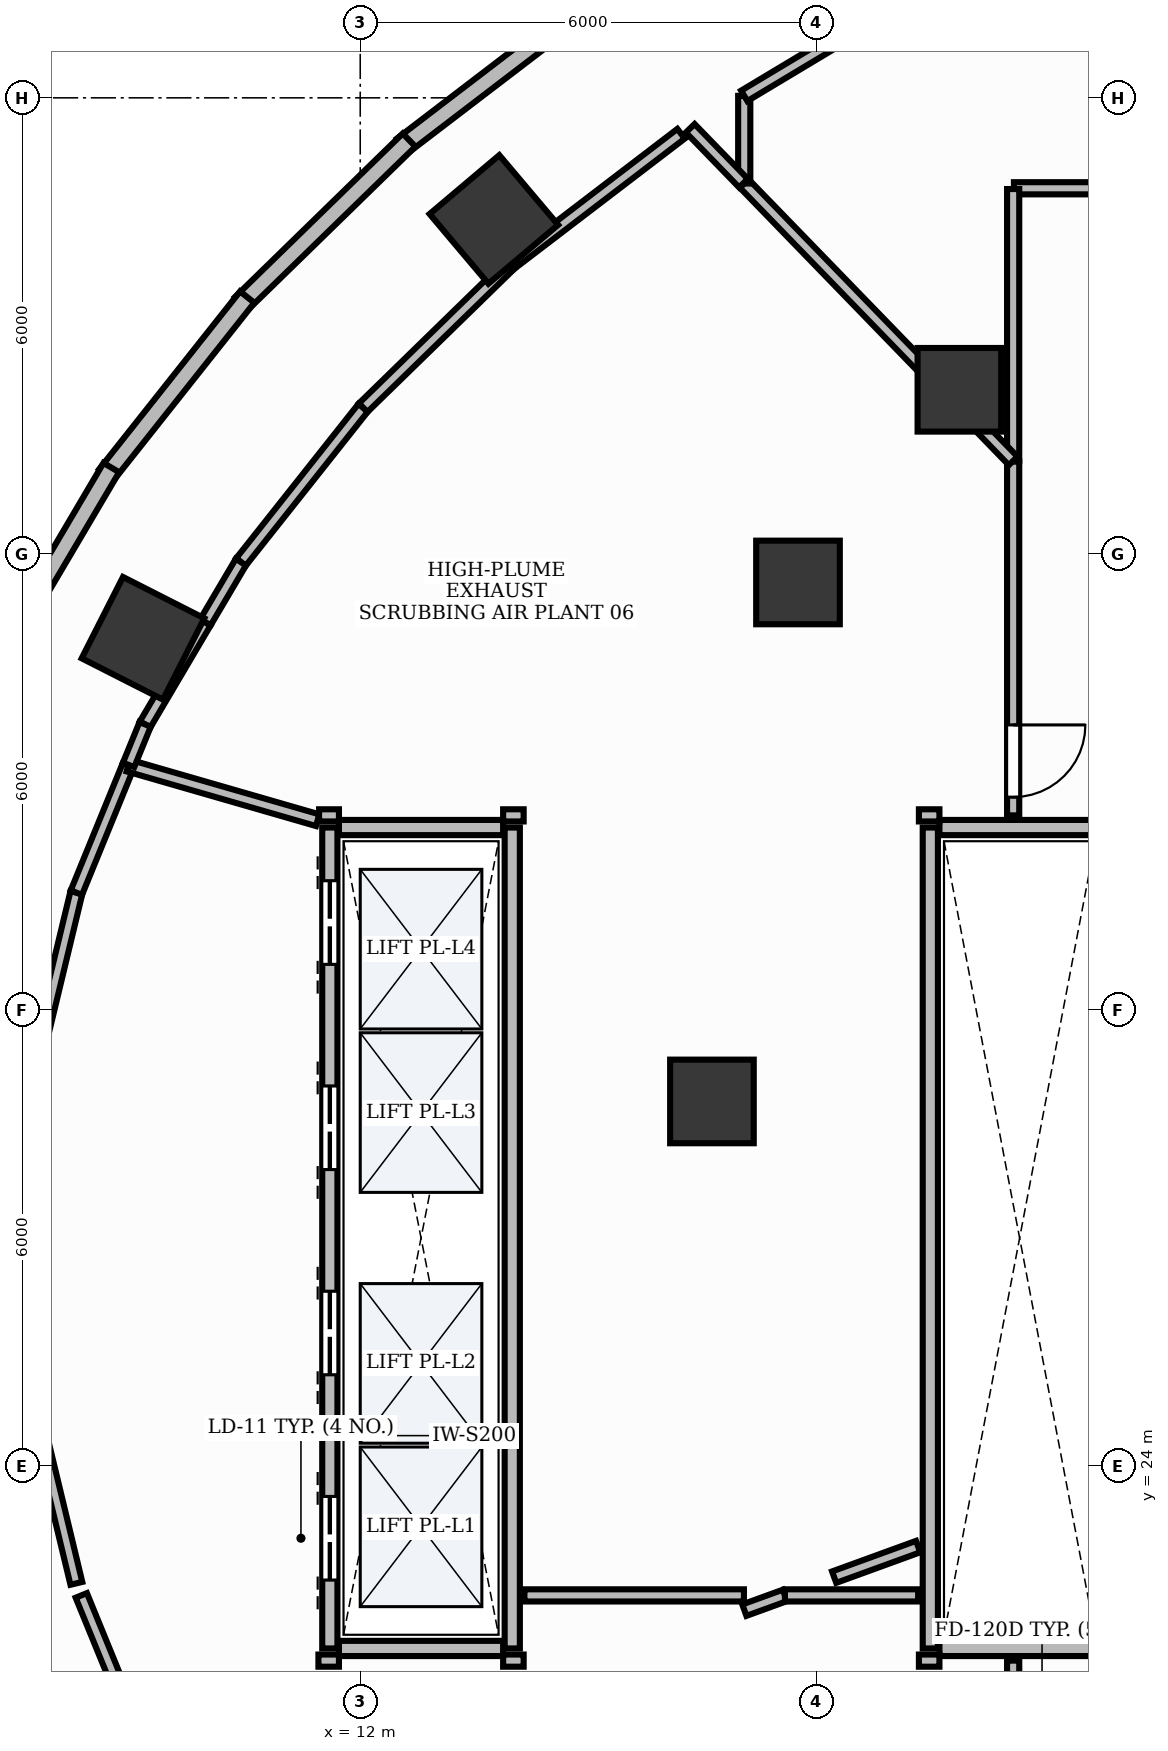
"""IFC4 building model, lengths in metres.
Left out: names, types, materials, properties, quantities, classifications, styles, units other than length and angle.
Written with IfcOpenShell. Run it as: python <this file> out.ifc"""

import sys

from ifc_helpers import new_model, si_unit, direction, frame, frame_2d, origin, origin_2d, place, context, subcontext, project, spatial, rectangle, extrude, element, fill, save


model = new_model("IFC4")
c1 = context("Model", 3, precision=1e-05, world=origin(), true_north=direction((0.0, 1.0)))
c2 = subcontext(c1, "Body", "Model", "MODEL_VIEW")
j1 = project(units=[si_unit("LENGTHUNIT", "METRE"), si_unit("PLANEANGLEUNIT", "RADIAN")], contexts=[c1])
p1 = place(None, origin())
s1 = spatial("IfcSite", under=j1, at=p1, CompositionType="ELEMENT")
p2 = place(p1, origin())
s2 = spatial("IfcBuilding", under=s1, at=p2, CompositionType="ELEMENT")
p3 = place(p2, frame((0.0, 0.0, 84.6)))
s3 = spatial("IfcBuildingStorey", under=s2, at=p3, CompositionType="ELEMENT", Elevation=84.6)
p4 = place(p3, frame((13.758, 40.4, -0.0), z_axis=(0.0, 0.0, 1.0), x_axis=(0.764246456939, 0.644924300253, 0.0)))
e1 = element("IfcColumn", 1, at=p4, inside=s3, PredefinedType="COLUMN", context=c2, shape_type="SweptSolid", body=[
    extrude(rectangle(XDim=1.2, YDim=1.2, at=origin_2d()), origin(), (0.0, 0.0, 1.0), 5.101),
])
p5 = place(p3, frame((19.883, 38.159, -0.0), z_axis=(0.0, 0.0, 1.0), x_axis=(1.0, 0.0, 0.0)))
e2 = element("IfcColumn", 2, at=p5, inside=s3, PredefinedType="COLUMN", context=c2, shape_type="SweptSolid", body=[
    extrude(rectangle(XDim=1.1, YDim=1.1, at=origin_2d()), origin(), (0.0, 0.0, 1.0), 5.101),
])
p6 = place(p3, frame((9.142, 34.889, -0.0), z_axis=(0.0, 0.0, 1.0), x_axis=(0.453057191132, 0.891481453292, 0.0)))
e3 = element("IfcColumn", 3, at=p6, inside=s3, PredefinedType="COLUMN", context=c2, shape_type="SweptSolid", body=[
    extrude(rectangle(XDim=1.2, YDim=1.2, at=origin_2d()), origin(), (0.0, 0.0, 1.0), 5.101),
])
for number, where, z_axis, x_axis in (
    (4, (17.759, 35.624, -0.0), (0.0, 0.0, 1.0), (1.0, 0.0, 0.0)),
    (5, (16.627, 28.797, -0.0), (0.0, 0.0, 1.0), (1.0, 0.0, 0.0)),
):
    element("IfcColumn", number, at=place(p3, frame(where, z_axis=z_axis, x_axis=x_axis)), inside=s3, PredefinedType="COLUMN", context=c2, shape_type="SweptSolid", body=[
        extrude(rectangle(XDim=1.1, YDim=1.1, at=origin_2d()), origin(), (0.0, 0.0, 1.0), 5.101),
    ])
p7 = place(p3, frame((15.085, 43.302, 0.0), z_axis=(0.0, 0.0, 1.0), x_axis=(-0.7944993285, -0.607265030289, 0.0)))
e6 = element("IfcWall", 6, at=p7, inside=s3, PredefinedType="STANDARD", context=c2, shape_type="SweptSolid", body=[
    extrude(rectangle(XDim=3.183, YDim=0.24, at=frame_2d((1.591, 0.0))), origin(), (0.0, 0.0, 1.0), 4.67),
])
p8 = place(p3, frame((12.643, 41.444, 0.0), z_axis=(0.0, 0.0, 1.0), x_axis=(-0.716118916223, -0.697978293235, 0.0)))
e7 = element("IfcWall", 7, at=p8, inside=s3, PredefinedType="STANDARD", context=c2, shape_type="SweptSolid", body=[
    extrude(rectangle(XDim=3.082, YDim=0.24, at=frame_2d((1.541, 0.0))), origin(), (0.0, 0.0, 1.0), 5.1),
])
p9 = place(p3, frame((10.513, 39.379, 0.0), z_axis=(0.0, 0.0, 1.0), x_axis=(-0.620956469373, -0.783845050469, 0.0)))
e8 = element("IfcWall", 8, at=p9, inside=s3, PredefinedType="STANDARD", context=c2, shape_type="SweptSolid", body=[
    extrude(rectangle(XDim=2.984, YDim=0.24, at=frame_2d((1.492, 0.0))), origin(), (0.0, 0.0, 1.0), 5.1),
])
p10 = place(p3, frame((8.725, 37.135, 0.0), z_axis=(0.0, 0.0, 1.0), x_axis=(-0.508169504761, -0.861257078015, 0.0)))
e9 = element("IfcWall", 9, at=p10, inside=s3, PredefinedType="STANDARD", context=c2, shape_type="SweptSolid", body=[
    extrude(rectangle(XDim=2.895, YDim=0.24, at=frame_2d((1.448, 0.0))), origin(), (0.0, 0.0, 1.0), 5.1),
])
p11 = place(p3, frame((11.6, 21.6, 0.0), z_axis=(0.0, 0.0, 1.0), x_axis=(0.0, 1.0, 0.0)))
e10 = element("IfcWall", 10, at=p11, inside=s3, PredefinedType="PARTITIONING", context=c2, shape_type="SweptSolid", body=[
    extrude(rectangle(XDim=10.8, YDim=0.2, at=frame_2d((5.4, 0.0))), origin(), (0.0, 0.0, 1.0), 3.96),
])
p12 = place(p11, frame((0.9, 0.0, 0.0)))
e11 = element("IfcOpeningElement", 11, at=p12, cuts=e10, PredefinedType="OPENING", context=c2, shape_type="SweptSolid", body=[
    extrude(rectangle(XDim=1.1, YDim=2.2, at=frame_2d((0.55, 1.1))), frame((0.0, 0.115, 0.0), z_axis=(0.0, -1.0, 0.0), x_axis=(1.0, 0.0, 0.0)), (0.0, 0.0, 1.0), 0.23),
])
p13 = place(p11, frame((3.6, 0.0, 0.0)))
e12 = element("IfcOpeningElement", 12, at=p13, cuts=e10, PredefinedType="OPENING", context=c2, shape_type="SweptSolid", body=[
    extrude(rectangle(XDim=1.1, YDim=2.2, at=frame_2d((0.55, 1.1))), frame((0.0, 0.115, 0.0), z_axis=(0.0, -1.0, 0.0), x_axis=(1.0, 0.0, 0.0)), (0.0, 0.0, 1.0), 0.23),
])
p14 = place(p11, frame((6.3, 0.0, 0.0)))
e13 = element("IfcOpeningElement", 13, at=p14, cuts=e10, PredefinedType="OPENING", context=c2, shape_type="SweptSolid", body=[
    extrude(rectangle(XDim=1.1, YDim=2.2, at=frame_2d((0.55, 1.1))), frame((0.0, 0.115, 0.0), z_axis=(0.0, -1.0, 0.0), x_axis=(1.0, 0.0, 0.0)), (0.0, 0.0, 1.0), 0.23),
])
p15 = place(p11, frame((9.0, 0.0, 0.0)))
e14 = element("IfcOpeningElement", 14, at=p15, cuts=e10, PredefinedType="OPENING", context=c2, shape_type="SweptSolid", body=[
    extrude(rectangle(XDim=1.1, YDim=2.2, at=frame_2d((0.55, 1.1))), frame((0.0, 0.115, 0.0), z_axis=(0.0, -1.0, 0.0), x_axis=(1.0, 0.0, 0.0)), (0.0, 0.0, 1.0), 0.23),
])
p16 = place(p3, frame((14.0, 21.6, 0.0), z_axis=(0.0, 0.0, 1.0), x_axis=(0.0, 1.0, 0.0)))
e15 = element("IfcWall", 15, at=p16, inside=s3, PredefinedType="PARTITIONING", context=c2, shape_type="SweptSolid", body=[
    extrude(rectangle(XDim=10.8, YDim=0.2, at=frame_2d((5.4, 0.0))), origin(), (0.0, 0.0, 1.0), 3.96),
])
for number, where, z_axis, x_axis in (
    (16, (11.72, 21.6, 0.0), (0.0, 0.0, 1.0), (1.0, 0.0, 0.0)),
    (17, (11.72, 32.4, 0.0), (0.0, 0.0, 1.0), (1.0, 0.0, 0.0)),
):
    element("IfcWall", number, at=place(p3, frame(where, z_axis=z_axis, x_axis=x_axis)), inside=s3, PredefinedType="PARTITIONING", context=c2, shape_type="SweptSolid", body=[
        extrude(rectangle(XDim=2.16, YDim=0.2, at=frame_2d((1.08, 0.0))), origin(), (0.0, 0.0, 1.0), 3.96),
    ])
p17 = place(p3, frame((19.5, 21.6, 0.0), z_axis=(0.0, 0.0, 1.0), x_axis=(0.0, 1.0, 0.0)))
e18 = element("IfcWall", 18, at=p17, inside=s3, PredefinedType="PARTITIONING", context=c2, shape_type="SweptSolid", body=[
    extrude(rectangle(XDim=10.8, YDim=0.2, at=frame_2d((5.4, 0.0))), origin(), (0.0, 0.0, 1.0), 3.96),
])
for number, where, z_axis, x_axis in (
    (19, (19.62, 21.6, 0.0), (0.0, 0.0, 1.0), (1.0, 0.0, 0.0)),
    (20, (19.62, 32.4, 0.0), (0.0, 0.0, 1.0), (1.0, 0.0, 0.0)),
):
    element("IfcWall", number, at=place(p3, frame(where, z_axis=z_axis, x_axis=x_axis)), inside=s3, PredefinedType="PARTITIONING", context=c2, shape_type="SweptSolid", body=[
        extrude(rectangle(XDim=2.11, YDim=0.2, at=frame_2d((1.055, 0.0))), origin(), (0.0, 0.0, 1.0), 3.96),
    ])
p18 = place(p3, frame((20.59, 21.44, 0.0), z_axis=(0.0, 0.0, 1.0), x_axis=(0.0, -1.0, 0.0)))
e21 = element("IfcWall", 21, at=p18, inside=s3, PredefinedType="PARTITIONING", context=c2, shape_type="SweptSolid", body=[
    extrude(rectangle(XDim=6.49, YDim=0.16, at=frame_2d((3.245, 0.0))), origin(), (0.0, 0.0, 1.0), 3.96),
])
p19 = place(p18, frame((0.24, 0.0, 0.0)))
e22 = element("IfcOpeningElement", 22, at=p19, cuts=e21, PredefinedType="OPENING", context=c2, shape_type="SweptSolid", body=[
    extrude(rectangle(XDim=0.95, YDim=2.15, at=frame_2d((0.475, 1.075))), frame((0.0, 0.095, 0.0), z_axis=(0.0, -1.0, 0.0), x_axis=(1.0, 0.0, 0.0)), (0.0, 0.0, 1.0), 0.19),
])
p20 = place(p3, frame((25.294, 40.81, 0.0), z_axis=(0.0, 0.0, 1.0), x_axis=(-1.0, 0.0, 0.0)))
e23 = element("IfcWall", 23, at=p20, inside=s3, PredefinedType="PARTITIONING", context=c2, shape_type="SweptSolid", body=[
    extrude(rectangle(XDim=4.694, YDim=0.16, at=frame_2d((2.347, 0.0))), origin(), (0.0, 0.0, 1.0), 3.96),
])
p21 = place(p20, frame((0.664, 0.0, 0.0)))
e24 = element("IfcOpeningElement", 24, at=p21, cuts=e23, PredefinedType="OPENING", context=c2, shape_type="SweptSolid", body=[
    extrude(rectangle(XDim=0.95, YDim=2.15, at=frame_2d((0.475, 1.075))), frame((0.0, 0.095, 0.0), z_axis=(0.0, -1.0, 0.0), x_axis=(1.0, 0.0, 0.0)), (0.0, 0.0, 1.0), 0.19),
])
p22 = place(p3, frame((20.59, 37.214, 0.0), z_axis=(0.0, 0.0, 1.0), x_axis=(0.0, -1.0, 0.0)))
e25 = element("IfcWall", 25, at=p22, inside=s3, PredefinedType="PARTITIONING", context=c2, shape_type="SweptSolid", body=[
    extrude(rectangle(XDim=4.654, YDim=0.16, at=frame_2d((2.327, 0.0))), origin(), (0.0, 0.0, 1.0), 3.96),
])
p23 = place(p22, frame((3.464, 0.0, 0.0)))
e26 = element("IfcOpeningElement", 26, at=p23, cuts=e25, PredefinedType="OPENING", context=c2, shape_type="SweptSolid", body=[
    extrude(rectangle(XDim=0.95, YDim=2.15, at=frame_2d((0.475, 1.075))), frame((0.0, 0.095, 0.0), z_axis=(0.0, -1.0, 0.0), x_axis=(1.0, 0.0, 0.0)), (0.0, 0.0, 1.0), 0.19),
])
p24 = place(p3, frame((7.722, 29.283, 0.0), z_axis=(0.0, 0.0, 1.0), x_axis=(0.233654937946, 0.972319582222, 0.0)))
e27 = element("IfcWall", 27, at=p24, inside=s3, PredefinedType="PARTITIONING", context=c2, shape_type="SweptSolid", body=[
    extrude(rectangle(XDim=2.325, YDim=0.16, at=frame_2d((1.163, 0.0))), origin(), (0.0, 0.0, 1.0), 3.96),
])
p25 = place(p3, frame((8.266, 31.544, 0.0), z_axis=(0.0, 0.0, 1.0), x_axis=(0.378374816085, 0.925652471802, 0.0)))
e28 = element("IfcWall", 28, at=p25, inside=s3, PredefinedType="PARTITIONING", context=c2, shape_type="SweptSolid", body=[
    extrude(rectangle(XDim=1.805, YDim=0.16, at=frame_2d((0.903, 0.0))), origin(), (0.0, 0.0, 1.0), 3.96),
])
p26 = place(p3, frame((8.949, 33.215, 0.0), z_axis=(0.0, 0.0, 1.0), x_axis=(0.960827931487, -0.277145604466, 0.0)))
e29 = element("IfcWall", 29, at=p26, inside=s3, PredefinedType="PARTITIONING", context=c2, shape_type="SweptSolid", body=[
    extrude(rectangle(XDim=2.593, YDim=0.16, at=frame_2d((1.296, 0.0))), origin(), (0.0, 0.0, 1.0), 3.96),
])
for number, where, z_axis, x_axis in (
    (30, (11.45, 21.44, 0.0), (0.0, 0.0, 1.0), (1.0, 0.0, 0.0)),
    (31, (13.88, 21.44, 0.0), (0.0, 0.0, 1.0), (1.0, 0.0, 0.0)),
):
    element("IfcWall", number, at=place(p3, frame(where, z_axis=z_axis, x_axis=x_axis)), inside=s3, PredefinedType="PARTITIONING", context=c2, shape_type="SweptSolid", body=[
        extrude(rectangle(XDim=0.27, YDim=0.16, at=frame_2d((0.135, 0.0))), origin(), (0.0, 0.0, 1.0), 3.96),
    ])
p27 = place(p3, frame((14.16, 22.298, 0.0), z_axis=(0.0, 0.0, 1.0), x_axis=(1.0, 0.0, 0.0)))
e32 = element("IfcWall", 32, at=p27, inside=s3, PredefinedType="PARTITIONING", context=c2, shape_type="SweptSolid", body=[
    extrude(rectangle(XDim=2.888, YDim=0.16, at=frame_2d((1.444, 0.0))), origin(), (0.0, 0.0, 1.0), 3.96),
])
p28 = place(p3, frame((17.053, 22.104, 0.0), z_axis=(0.0, 0.0, 1.0), x_axis=(0.93978087077, 0.34177758109, 0.0)))
e33 = element("IfcWall", 33, at=p28, inside=s3, PredefinedType="PARTITIONING", context=c2, shape_type="SweptSolid", body=[
    extrude(rectangle(XDim=0.568, YDim=0.16, at=frame_2d((0.284, 0.0))), origin(), (0.0, 0.0, 1.0), 3.96),
])
p29 = place(p3, frame((17.587, 22.298, 0.0), z_axis=(0.0, 0.0, 1.0), x_axis=(1.0, 0.0, 0.0)))
e34 = element("IfcWall", 34, at=p29, inside=s3, PredefinedType="PARTITIONING", context=c2, shape_type="SweptSolid", body=[
    extrude(rectangle(XDim=1.752, YDim=0.16, at=frame_2d((0.876, 0.0))), origin(), (0.0, 0.0, 1.0), 3.96),
])
p30 = place(p3, frame((19.35, 21.44, 0.0), z_axis=(0.0, 0.0, 1.0), x_axis=(1.0, 0.0, 0.0)))
e35 = element("IfcWall", 35, at=p30, inside=s3, PredefinedType="PARTITIONING", context=c2, shape_type="SweptSolid", body=[
    extrude(rectangle(XDim=0.27, YDim=0.16, at=frame_2d((0.135, 0.0))), origin(), (0.0, 0.0, 1.0), 3.96),
])
p31 = place(p3, frame((9.17, 20.243, 0.0), z_axis=(0.0, 0.0, 1.0), x_axis=(-0.378303005032, 0.925681822433, 0.0)))
e36 = element("IfcWall", 36, at=p31, inside=s3, PredefinedType="PARTITIONING", context=c2, shape_type="SweptSolid", body=[
    extrude(rectangle(XDim=2.219, YDim=0.16, at=frame_2d((1.11, 0.0))), origin(), (0.0, 0.0, 1.0), 3.96),
])
p32 = place(p3, frame((8.265, 22.456, 0.0), z_axis=(0.0, 0.0, 1.0), x_axis=(-0.233654937946, 0.972319582222, 0.0)))
e37 = element("IfcWall", 37, at=p32, inside=s3, PredefinedType="PARTITIONING", context=c2, shape_type="SweptSolid", body=[
    extrude(rectangle(XDim=2.325, YDim=0.16, at=frame_2d((1.163, 0.0))), origin(), (0.0, 0.0, 1.0), 3.96),
])
p33 = place(p3, frame((20.59, 40.8, 0.0), z_axis=(0.0, 0.0, 1.0), x_axis=(0.0, -1.0, 0.0)))
e38 = element("IfcWall", 38, at=p33, inside=s3, PredefinedType="PARTITIONING", context=c2, shape_type="SweptSolid", body=[
    extrude(rectangle(XDim=3.576, YDim=0.16, at=frame_2d((1.788, 0.0))), origin(), (0.0, 0.0, 1.0), 3.96),
])
p34 = place(p3, frame((20.59, 37.224, 0.0), z_axis=(0.0, 0.0, 1.0), x_axis=(-0.696094823364, 0.717949856805, 0.0)))
e39 = element("IfcWall", 39, at=p34, inside=s3, PredefinedType="PARTITIONING", context=c2, shape_type="SweptSolid", body=[
    extrude(rectangle(XDim=5.083, YDim=0.16, at=frame_2d((2.542, 0.0))), origin(), (0.0, 0.0, 1.0), 3.96),
])
p35 = place(p3, frame((17.052, 40.873, 0.0), z_axis=(0.0, 0.0, 1.0), x_axis=(0.0, 1.0, 0.0)))
e40 = element("IfcWall", 40, at=p35, inside=s3, PredefinedType="PARTITIONING", context=c2, shape_type="SweptSolid", body=[
    extrude(rectangle(XDim=1.153, YDim=0.16, at=frame_2d((0.577, 0.0))), origin(), (0.0, 0.0, 1.0), 3.96),
])
p36 = place(p3, frame((17.052, 42.026, 0.0), z_axis=(0.0, 0.0, 1.0), x_axis=(0.857525745267, 0.514441052214, 0.0)))
e41 = element("IfcWall", 41, at=p36, inside=s3, PredefinedType="PARTITIONING", context=c2, shape_type="SweptSolid", body=[
    extrude(rectangle(XDim=1.969, YDim=0.16, at=frame_2d((0.984, 0.0))), origin(), (0.0, 0.0, 1.0), 3.96),
])
p37 = place(p3, frame((9.17, 33.757, 0.0), z_axis=(0.0, 0.0, 1.0), x_axis=(0.508116288895, 0.861288474879, 0.0)))
e42 = element("IfcWall", 42, at=p37, inside=s3, PredefinedType="PARTITIONING", context=c2, shape_type="SweptSolid", body=[
    extrude(rectangle(XDim=1.557, YDim=0.16, at=frame_2d((0.778, 0.0))), origin(), (0.0, 0.0, 1.0), 3.96),
])
p38 = place(p3, frame((9.964, 35.102, 0.0), z_axis=(0.0, 0.0, 1.0), x_axis=(0.508192213781, 0.861243678556, 0.0)))
e43 = element("IfcWall", 43, at=p38, inside=s3, PredefinedType="PARTITIONING", context=c2, shape_type="SweptSolid", body=[
    extrude(rectangle(XDim=0.919, YDim=0.16, at=frame_2d((0.459, 0.0))), origin(), (0.0, 0.0, 1.0), 3.96),
])
p39 = place(p3, frame((10.431, 35.894, 0.0), z_axis=(0.0, 0.0, 1.0), x_axis=(0.621019334477, 0.783795245078, 0.0)))
e44 = element("IfcWall", 44, at=p39, inside=s3, PredefinedType="PARTITIONING", context=c2, shape_type="SweptSolid", body=[
    extrude(rectangle(XDim=2.589, YDim=0.16, at=frame_2d((1.294, 0.0))), origin(), (0.0, 0.0, 1.0), 3.96),
])
p40 = place(p3, frame((12.039, 37.924, 0.0), z_axis=(0.0, 0.0, 1.0), x_axis=(0.716117399469, 0.697979849407, 0.0)))
e45 = element("IfcWall", 45, at=p40, inside=s3, PredefinedType="PARTITIONING", context=c2, shape_type="SweptSolid", body=[
    extrude(rectangle(XDim=2.706, YDim=0.16, at=frame_2d((1.353, 0.0))), origin(), (0.0, 0.0, 1.0), 3.96),
])
p41 = place(p3, frame((13.977, 39.812, 0.0), z_axis=(0.0, 0.0, 1.0), x_axis=(0.794468240787, 0.607305700928, 0.0)))
e46 = element("IfcWall", 46, at=p41, inside=s3, PredefinedType="PARTITIONING", context=c2, shape_type="SweptSolid", body=[
    extrude(rectangle(XDim=2.824, YDim=0.16, at=frame_2d((1.412, 0.0))), origin(), (0.0, 0.0, 1.0), 3.96),
])
p42 = place(p3, frame((16.342, 41.6, 0.0), z_axis=(0.0, 0.0, 1.0), x_axis=(0.696104152684, -0.71794081136, 0.0)))
e47 = element("IfcWall", 47, at=p42, inside=s3, PredefinedType="PARTITIONING", context=c2, shape_type="SweptSolid", body=[
    extrude(rectangle(XDim=1.006, YDim=0.16, at=frame_2d((0.503, 0.0))), origin(), (0.0, 0.0, 1.0), 3.96),
])
p43 = place(p3, frame((19.62, 32.56, 0.0), z_axis=(0.0, 0.0, 1.0), x_axis=(-1.0, 0.0, 0.0)))
e48 = element("IfcWall", 48, at=p43, inside=s3, PredefinedType="PARTITIONING", context=c2, shape_type="SweptSolid", body=[
    extrude(rectangle(XDim=0.27, YDim=0.16, at=frame_2d((0.135, 0.0))), origin(), (0.0, 0.0, 1.0), 3.96),
])
p44 = place(p3, frame((19.34, 22.94, 0.0), z_axis=(0.0, 0.0, 1.0), x_axis=(-0.939714591609, -0.341959772952, 0.0)))
e49 = element("IfcWall", 49, at=p44, inside=s3, PredefinedType="PARTITIONING", context=c2, shape_type="SweptSolid", body=[
    extrude(rectangle(XDim=1.176, YDim=0.16, at=frame_2d((0.588, 0.0))), origin(), (0.0, 0.0, 1.0), 3.96),
])
p45 = place(p3, frame((14.15, 32.56, 0.0), z_axis=(0.0, 0.0, 1.0), x_axis=(-1.0, 0.0, 0.0)))
e50 = element("IfcWall", 50, at=p45, inside=s3, PredefinedType="PARTITIONING", context=c2, shape_type="SweptSolid", body=[
    extrude(rectangle(XDim=0.27, YDim=0.16, at=frame_2d((0.135, 0.0))), origin(), (0.0, 0.0, 1.0), 3.96),
])
p46 = place(p3, frame((11.72, 32.56, 0.0), z_axis=(0.0, 0.0, 1.0), x_axis=(-1.0, 0.0, 0.0)))
e51 = element("IfcWall", 51, at=p46, inside=s3, PredefinedType="PARTITIONING", context=c2, shape_type="SweptSolid", body=[
    extrude(rectangle(XDim=0.262, YDim=0.16, at=frame_2d((0.131, 0.0))), origin(), (0.0, 0.0, 1.0), 3.96),
])
p47 = place(p3, frame((8.953, 33.225, 0.0), z_axis=(0.0, 0.0, 1.0), x_axis=(0.378119955125, 0.925756609232, 0.0)))
e52 = element("IfcWall", 52, at=p47, inside=s3, PredefinedType="PARTITIONING", context=c2, shape_type="SweptSolid", body=[
    extrude(rectangle(XDim=0.575, YDim=0.16, at=frame_2d((0.287, 0.0))), origin(), (0.0, 0.0, 1.0), 3.96),
])
p48 = place(p12, origin())
e53 = element("IfcDoor", 53, at=p48, inside=s3, OperationType="DOUBLE_DOOR_SLIDING", PredefinedType="DOOR", context=c2, shape_type="SweptSolid", body=[
    extrude(rectangle(XDim=1.1, YDim=2.2, at=frame_2d((0.55, 1.1))), frame((0.0, 0.025, 0.0), z_axis=(0.0, -1.0, 0.0), x_axis=(1.0, 0.0, 0.0)), (0.0, 0.0, 1.0), 0.05),
])
fill(e11, e53)
p49 = place(p13, origin())
e54 = element("IfcDoor", 54, at=p49, inside=s3, OperationType="DOUBLE_DOOR_SLIDING", PredefinedType="DOOR", context=c2, shape_type="SweptSolid", body=[
    extrude(rectangle(XDim=1.1, YDim=2.2, at=frame_2d((0.55, 1.1))), frame((0.0, 0.025, 0.0), z_axis=(0.0, -1.0, 0.0), x_axis=(1.0, 0.0, 0.0)), (0.0, 0.0, 1.0), 0.05),
])
fill(e12, e54)
p50 = place(p14, origin())
e55 = element("IfcDoor", 55, at=p50, inside=s3, OperationType="DOUBLE_DOOR_SLIDING", PredefinedType="DOOR", context=c2, shape_type="SweptSolid", body=[
    extrude(rectangle(XDim=1.1, YDim=2.2, at=frame_2d((0.55, 1.1))), frame((0.0, 0.025, 0.0), z_axis=(0.0, -1.0, 0.0), x_axis=(1.0, 0.0, 0.0)), (0.0, 0.0, 1.0), 0.05),
])
fill(e13, e55)
p51 = place(p15, origin())
e56 = element("IfcDoor", 56, at=p51, inside=s3, OperationType="DOUBLE_DOOR_SLIDING", PredefinedType="DOOR", context=c2, shape_type="SweptSolid", body=[
    extrude(rectangle(XDim=1.1, YDim=2.2, at=frame_2d((0.55, 1.1))), frame((0.0, 0.025, 0.0), z_axis=(0.0, -1.0, 0.0), x_axis=(1.0, 0.0, 0.0)), (0.0, 0.0, 1.0), 0.05),
])
fill(e14, e56)
p52 = place(p23, origin())
e57 = element("IfcDoor", 57, at=p52, inside=s3, OperationType="SINGLE_SWING_LEFT", PredefinedType="DOOR", context=c2, shape_type="SweptSolid", body=[
    extrude(rectangle(XDim=0.95, YDim=2.15, at=frame_2d((0.475, 1.075))), frame((0.0, 0.025, 0.0), z_axis=(0.0, -1.0, 0.0), x_axis=(1.0, 0.0, 0.0)), (0.0, 0.0, 1.0), 0.05),
])
fill(e26, e57)
save(model, sys.argv[1])
